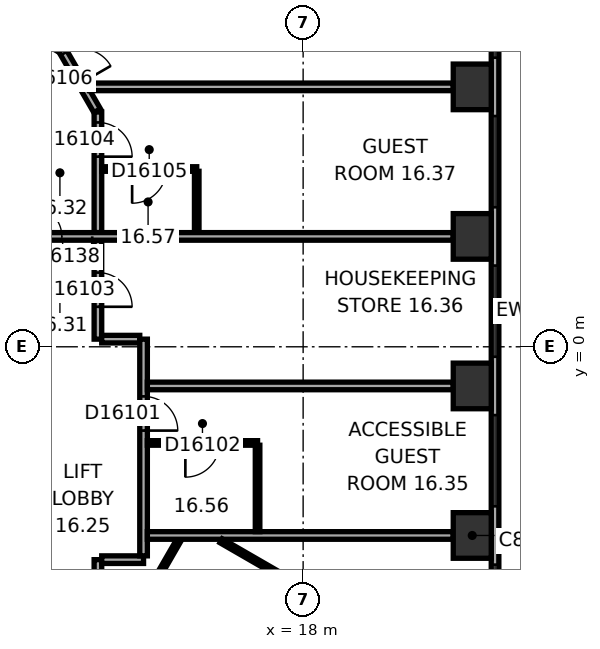
"""IFC4 building model, lengths in metres.
Left out: names, types, materials, properties, quantities, classifications, styles, units other than length and angle.
Written with IfcOpenShell. Run it as: python <this file> out.ifc"""

import sys

from ifc_helpers import new_model, si_unit, direction, frame, frame_2d, origin, origin_2d, place, context, subcontext, project, spatial, rectangle, extrude, element, fill, save


model = new_model("IFC4")
c1 = context("Model", 3, precision=1e-05, world=origin(), true_north=direction((0.0, 1.0)))
c2 = subcontext(c1, "Body", "Model", "MODEL_VIEW")
j1 = project(units=[si_unit("LENGTHUNIT", "METRE"), si_unit("PLANEANGLEUNIT", "RADIAN")], contexts=[c1])
p1 = place(None, origin())
s1 = spatial("IfcSite", under=j1, at=p1, CompositionType="ELEMENT")
p2 = place(p1, origin())
s2 = spatial("IfcBuilding", under=s1, at=p2, CompositionType="ELEMENT")
p3 = place(p2, frame((0.0, 0.0, 73.7)))
s3 = spatial("IfcBuildingStorey", under=s2, at=p3, CompositionType="ELEMENT", Elevation=73.7)
for number, where, z_axis, x_axis in (
    (1, (22.45, -4.965, 0.0), (0.0, 0.0, 1.0), (0.0, 1.0, 0.0)),
    (2, (22.45, -1.03, 0.0), (0.0, 0.0, 1.0), (0.0, 1.0, 0.0)),
    (3, (22.45, 2.905, 0.0), (0.0, 0.0, 1.0), (0.0, 1.0, 0.0)),
    (4, (22.45, 6.839, 0.0), (0.0, 0.0, 1.0), (0.0, 1.0, 0.0)),
):
    element("IfcColumn", number, at=place(p3, frame(where, z_axis=z_axis, x_axis=x_axis)), inside=s3, PredefinedType="COLUMN", context=c2, shape_type="SweptSolid", body=[
        extrude(rectangle(XDim=1.2, YDim=1.0, at=origin_2d()), origin(), (0.0, 0.0, 1.0), 3.3),
    ])
p4 = place(p3, frame((23.05, -9.687, 0.0), z_axis=(0.0, 0.0, 1.0), x_axis=(0.0, 1.0, 0.0)))
e5 = element("IfcWall", 5, at=p4, inside=s3, PredefinedType="STANDARD", context=c2, shape_type="SweptSolid", body=[
    extrude(rectangle(XDim=21.246, YDim=0.2, at=frame_2d((10.623, 0.0))), origin(), (0.0, 0.0, 1.0), 3.3),
])
p5 = place(p4, frame((1.555, 0.0, 0.8)))
e6 = element("IfcOpeningElement", 6, at=p5, cuts=e5, PredefinedType="OPENING", context=c2, shape_type="SweptSolid", body=[
    extrude(rectangle(XDim=2.4, YDim=1.7, at=frame_2d((1.2, 0.85))), frame((0.0, 0.11, 0.0), z_axis=(0.0, -1.0, 0.0), x_axis=(1.0, 0.0, 0.0)), (0.0, 0.0, 1.0), 0.22),
])
p6 = place(p4, frame((5.489, 0.0, 0.8)))
e7 = element("IfcOpeningElement", 7, at=p6, cuts=e5, PredefinedType="OPENING", context=c2, shape_type="SweptSolid", body=[
    extrude(rectangle(XDim=2.4, YDim=1.7, at=frame_2d((1.2, 0.85))), frame((0.0, 0.11, 0.0), z_axis=(0.0, -1.0, 0.0), x_axis=(1.0, 0.0, 0.0)), (0.0, 0.0, 1.0), 0.22),
])
p7 = place(p4, frame((9.424, 0.0, 0.8)))
e8 = element("IfcOpeningElement", 8, at=p7, cuts=e5, PredefinedType="OPENING", context=c2, shape_type="SweptSolid", body=[
    extrude(rectangle(XDim=2.4, YDim=1.7, at=frame_2d((1.2, 0.85))), frame((0.0, 0.11, 0.0), z_axis=(0.0, -1.0, 0.0), x_axis=(1.0, 0.0, 0.0)), (0.0, 0.0, 1.0), 0.22),
])
p8 = place(p4, frame((13.358, 0.0, 0.8)))
e9 = element("IfcOpeningElement", 9, at=p8, cuts=e5, PredefinedType="OPENING", context=c2, shape_type="SweptSolid", body=[
    extrude(rectangle(XDim=2.4, YDim=1.7, at=frame_2d((1.2, 0.85))), frame((0.0, 0.11, 0.0), z_axis=(0.0, -1.0, 0.0), x_axis=(1.0, 0.0, 0.0)), (0.0, 0.0, 1.0), 0.22),
])
p9 = place(p4, frame((17.293, 0.0, 0.8)))
e10 = element("IfcOpeningElement", 10, at=p9, cuts=e5, PredefinedType="OPENING", context=c2, shape_type="SweptSolid", body=[
    extrude(rectangle(XDim=2.4, YDim=1.7, at=frame_2d((1.2, 0.85))), frame((0.0, 0.11, 0.0), z_axis=(0.0, -1.0, 0.0), x_axis=(1.0, 0.0, 0.0)), (0.0, 0.0, 1.0), 0.22),
])
p10 = place(p3, frame((12.58, 6.212, 0.0), z_axis=(0.0, 0.0, 1.0), x_axis=(-0.500063286585, 0.865988862174, 0.0)))
e11 = element("IfcWall", 11, at=p10, inside=s3, PredefinedType="PARTITIONING", context=c2, shape_type="SweptSolid", body=[
    extrude(rectangle(XDim=1.86, YDim=0.2, at=frame_2d((0.93, 0.0))), origin(), (0.0, 0.0, 1.0), 2.95),
])
p11 = place(p10, frame((0.842, 0.0, 0.0)))
e12 = element("IfcOpeningElement", 12, at=p11, cuts=e11, PredefinedType="OPENING", context=c2, shape_type="SweptSolid", body=[
    extrude(rectangle(XDim=0.9, YDim=2.1, at=frame_2d((0.45, 1.05))), frame((0.0, 0.11, 0.0), z_axis=(0.0, -1.0, 0.0), x_axis=(1.0, 0.0, 0.0)), (0.0, 0.0, 1.0), 0.22),
])
p12 = place(p3, frame((12.6, -6.138, 0.0), z_axis=(0.0, 0.0, 1.0), x_axis=(0.0, 1.0, 0.0)))
e13 = element("IfcWall", 13, at=p12, inside=s3, PredefinedType="PARTITIONING", context=c2, shape_type="SweptSolid", body=[
    extrude(rectangle(XDim=0.537, YDim=0.2, at=frame_2d((0.268, 0.0))), origin(), (0.0, 0.0, 1.0), 2.95),
])
p13 = place(p3, frame((12.6, 0.201, 0.0), z_axis=(0.0, 0.0, 1.0), x_axis=(0.0, 1.0, 0.0)))
e14 = element("IfcWall", 14, at=p13, inside=s3, PredefinedType="PARTITIONING", context=c2, shape_type="SweptSolid", body=[
    extrude(rectangle(XDim=2.604, YDim=0.2, at=frame_2d((1.302, 0.0))), origin(), (0.0, 0.0, 1.0), 2.95),
])
p14 = place(p13, frame((0.852, 0.0, 0.0)))
e15 = element("IfcOpeningElement", 15, at=p14, cuts=e14, PredefinedType="OPENING", context=c2, shape_type="SweptSolid", body=[
    extrude(rectangle(XDim=0.9, YDim=2.1, at=frame_2d((0.45, 1.05))), frame((0.0, 0.11, 0.0), z_axis=(0.0, -1.0, 0.0), x_axis=(1.0, 0.0, 0.0)), (0.0, 0.0, 1.0), 0.22),
])
p15 = place(p3, frame((12.6, 3.004, 0.0), z_axis=(0.0, 0.0, 1.0), x_axis=(0.0, 1.0, 0.0)))
e16 = element("IfcWall", 16, at=p15, inside=s3, PredefinedType="PARTITIONING", context=c2, shape_type="SweptSolid", body=[
    extrude(rectangle(XDim=3.173, YDim=0.2, at=frame_2d((1.586, 0.0))), origin(), (0.0, 0.0, 1.0), 2.95),
])
p16 = place(p15, frame((1.998, 0.0, 0.0)))
e17 = element("IfcOpeningElement", 17, at=p16, cuts=e16, PredefinedType="OPENING", context=c2, shape_type="SweptSolid", body=[
    extrude(rectangle(XDim=0.9, YDim=2.1, at=frame_2d((0.45, 1.05))), frame((0.0, 0.11, 0.0), z_axis=(0.0, -1.0, 0.0), x_axis=(1.0, 0.0, 0.0)), (0.0, 0.0, 1.0), 0.22),
])
p17 = place(p3, frame((12.7, -5.601, 0.0), z_axis=(0.0, 0.0, 1.0), x_axis=(1.0, 0.0, 0.0)))
e18 = element("IfcWall", 18, at=p17, inside=s3, PredefinedType="PARTITIONING", context=c2, shape_type="SweptSolid", body=[
    extrude(rectangle(XDim=1.101, YDim=0.2, at=frame_2d((0.551, 0.0))), origin(), (0.0, 0.0, 1.0), 2.95),
])
p18 = place(p3, frame((12.7, 4.677, 0.0), z_axis=(0.0, 0.0, 1.0), x_axis=(1.0, 0.0, 0.0)))
e19 = element("IfcWall", 19, at=p18, inside=s3, PredefinedType="PARTITIONING", context=c2, shape_type="SweptSolid", body=[
    extrude(rectangle(XDim=2.5, YDim=0.12, at=frame_2d((1.25, 0.0))), origin(), (0.0, 0.0, 1.0), 2.95),
])
p19 = place(p18, frame((0.8, 0.0, 0.0)))
e20 = element("IfcOpeningElement", 20, at=p19, cuts=e19, PredefinedType="OPENING", context=c2, shape_type="SweptSolid", body=[
    extrude(rectangle(XDim=0.9, YDim=2.1, at=frame_2d((0.45, 1.05))), frame((0.0, 0.07, 0.0), z_axis=(0.0, -1.0, 0.0), x_axis=(1.0, 0.0, 0.0)), (0.0, 0.0, 1.0), 0.14),
])
p20 = place(p3, frame((13.701, 0.201, 0.0), z_axis=(0.0, 0.0, 1.0), x_axis=(-1.0, 0.0, 0.0)))
e21 = element("IfcWall", 21, at=p20, inside=s3, PredefinedType="PARTITIONING", context=c2, shape_type="SweptSolid", body=[
    extrude(rectangle(XDim=1.001, YDim=0.2, at=frame_2d((0.5, 0.0))), origin(), (0.0, 0.0, 1.0), 2.95),
])
p21 = place(p3, frame((13.801, -5.501, 0.0), z_axis=(0.0, 0.0, 1.0), x_axis=(0.0, 1.0, 0.0)))
e22 = element("IfcWall", 22, at=p21, inside=s3, PredefinedType="PARTITIONING", context=c2, shape_type="SweptSolid", body=[
    extrude(rectangle(XDim=5.702, YDim=0.2, at=frame_2d((2.851, 0.0))), origin(), (0.0, 0.0, 1.0), 2.95),
])
p22 = place(p21, frame((3.296, 0.0, 0.0)))
e23 = element("IfcOpeningElement", 23, at=p22, cuts=e22, PredefinedType="OPENING", context=c2, shape_type="SweptSolid", body=[
    extrude(rectangle(XDim=0.9, YDim=2.1, at=frame_2d((0.45, 1.05))), frame((0.0, 0.11, 0.0), z_axis=(0.0, -1.0, 0.0), x_axis=(1.0, 0.0, 0.0)), (0.0, 0.0, 1.0), 0.22),
])
p23 = place(p3, frame((13.901, -6.524, 0.0), z_axis=(0.0, 0.0, 1.0), x_axis=(0.499964162598, 0.86604609353, 0.0)))
e24 = element("IfcWall", 24, at=p23, inside=s3, PredefinedType="PARTITIONING", context=c2, shape_type="SweptSolid", body=[
    extrude(rectangle(XDim=1.661, YDim=0.12, at=frame_2d((0.831, 0.0))), origin(), (0.0, 0.0, 1.0), 2.95),
])
p24 = place(p3, frame((13.901, -4.965, 0.0), z_axis=(0.0, 0.0, 1.0), x_axis=(1.0, 0.0, 0.0)))
e25 = element("IfcWall", 25, at=p24, inside=s3, PredefinedType="PARTITIONING", context=c2, shape_type="SweptSolid", body=[
    extrude(rectangle(XDim=8.049, YDim=0.2, at=frame_2d((4.024, 0.0))), origin(), (0.0, 0.0, 1.0), 2.95),
])
p25 = place(p3, frame((13.901, -2.53, 0.0), z_axis=(0.0, 0.0, 1.0), x_axis=(1.0, 0.0, 0.0)))
e26 = element("IfcWall", 26, at=p25, inside=s3, PredefinedType="PARTITIONING", context=c2, shape_type="SweptSolid", body=[
    extrude(rectangle(XDim=2.9, YDim=0.12, at=frame_2d((1.45, 0.0))), origin(), (0.0, 0.0, 1.0), 2.95),
])
p26 = place(p25, frame((1.0, 0.0, 0.0)))
e27 = element("IfcOpeningElement", 27, at=p26, cuts=e26, PredefinedType="OPENING", context=c2, shape_type="SweptSolid", body=[
    extrude(rectangle(XDim=0.9, YDim=2.1, at=frame_2d((0.45, 1.05))), frame((0.0, 0.07, 0.0), z_axis=(0.0, -1.0, 0.0), x_axis=(1.0, 0.0, 0.0)), (0.0, 0.0, 1.0), 0.14),
])
p27 = place(p3, frame((15.2, 4.618, 0.0), z_axis=(0.0, 0.0, 1.0), x_axis=(0.0, -1.0, 0.0)))
e28 = element("IfcWall", 28, at=p27, inside=s3, PredefinedType="PARTITIONING", context=c2, shape_type="SweptSolid", body=[
    extrude(rectangle(XDim=1.613, YDim=0.12, at=frame_2d((0.807, 0.0))), origin(), (0.0, 0.0, 1.0), 2.95),
])
p28 = place(p3, frame((15.841, -5.104, 0.0), z_axis=(0.0, 0.0, 1.0), x_axis=(0.866025591402, -0.499999675036, 0.0)))
e29 = element("IfcWall", 29, at=p28, inside=s3, PredefinedType="PARTITIONING", context=c2, shape_type="SweptSolid", body=[
    extrude(rectangle(XDim=1.83, YDim=0.12, at=frame_2d((0.915, 0.0))), origin(), (0.0, 0.0, 1.0), 2.95),
])
p29 = place(p3, frame((16.801, -2.59, 0.0), z_axis=(0.0, 0.0, 1.0), x_axis=(0.0, -1.0, 0.0)))
e30 = element("IfcWall", 30, at=p29, inside=s3, PredefinedType="PARTITIONING", context=c2, shape_type="SweptSolid", body=[
    extrude(rectangle(XDim=2.274, YDim=0.12, at=frame_2d((1.137, 0.0))), origin(), (0.0, 0.0, 1.0), 2.95),
])
p30 = place(p3, frame((21.95, -1.03, 0.0), z_axis=(0.0, 0.0, 1.0), x_axis=(-1.0, 0.0, 0.0)))
e31 = element("IfcWall", 31, at=p30, inside=s3, PredefinedType="PARTITIONING", context=c2, shape_type="SweptSolid", body=[
    extrude(rectangle(XDim=8.049, YDim=0.2, at=frame_2d((4.024, 0.0))), origin(), (0.0, 0.0, 1.0), 2.15),
])
p31 = place(p3, frame((21.95, 2.905, 0.0), z_axis=(0.0, 0.0, 1.0), x_axis=(-1.0, 0.0, 0.0)))
e32 = element("IfcWall", 32, at=p31, inside=s3, PredefinedType="PARTITIONING", context=c2, shape_type="SweptSolid", body=[
    extrude(rectangle(XDim=11.25, YDim=0.2, at=frame_2d((5.625, 0.0))), origin(), (0.0, 0.0, 1.0), 2.95),
])
p32 = place(p31, frame((9.5, 0.0, 0.0)))
e33 = element("IfcOpeningElement", 33, at=p32, cuts=e32, PredefinedType="OPENING", context=c2, shape_type="SweptSolid", body=[
    extrude(rectangle(XDim=1.6, YDim=2.1, at=frame_2d((0.8, 1.05))), frame((0.0, 0.11, 0.0), z_axis=(0.0, -1.0, 0.0), x_axis=(1.0, 0.0, 0.0)), (0.0, 0.0, 1.0), 0.22),
])
p33 = place(p3, frame((21.95, 6.839, 0.0), z_axis=(0.0, 0.0, 1.0), x_axis=(-1.0, 0.0, 0.0)))
e34 = element("IfcWall", 34, at=p33, inside=s3, PredefinedType="PARTITIONING", context=c2, shape_type="SweptSolid", body=[
    extrude(rectangle(XDim=9.572, YDim=0.2, at=frame_2d((4.786, 0.0))), origin(), (0.0, 0.0, 1.0), 2.95),
])
p34 = place(p5, origin())
e35 = element("IfcWindow", 35, at=p34, inside=s3, PartitioningType="SINGLE_PANEL", PredefinedType="WINDOW", context=c2, shape_type="SweptSolid", body=[
    extrude(rectangle(XDim=2.4, YDim=1.7, at=frame_2d((1.2, 0.85))), frame((0.0, 0.03, 0.0), z_axis=(0.0, -1.0, 0.0), x_axis=(1.0, 0.0, 0.0)), (0.0, 0.0, 1.0), 0.06),
])
fill(e6, e35)
p35 = place(p6, origin())
e36 = element("IfcWindow", 36, at=p35, inside=s3, PartitioningType="SINGLE_PANEL", PredefinedType="WINDOW", context=c2, shape_type="SweptSolid", body=[
    extrude(rectangle(XDim=2.4, YDim=1.7, at=frame_2d((1.2, 0.85))), frame((0.0, 0.03, 0.0), z_axis=(0.0, -1.0, 0.0), x_axis=(1.0, 0.0, 0.0)), (0.0, 0.0, 1.0), 0.06),
])
fill(e7, e36)
p36 = place(p7, origin())
e37 = element("IfcWindow", 37, at=p36, inside=s3, PartitioningType="SINGLE_PANEL", PredefinedType="WINDOW", context=c2, shape_type="SweptSolid", body=[
    extrude(rectangle(XDim=2.4, YDim=1.7, at=frame_2d((1.2, 0.85))), frame((0.0, 0.03, 0.0), z_axis=(0.0, -1.0, 0.0), x_axis=(1.0, 0.0, 0.0)), (0.0, 0.0, 1.0), 0.06),
])
fill(e8, e37)
p37 = place(p8, origin())
e38 = element("IfcWindow", 38, at=p37, inside=s3, PartitioningType="SINGLE_PANEL", PredefinedType="WINDOW", context=c2, shape_type="SweptSolid", body=[
    extrude(rectangle(XDim=2.4, YDim=1.7, at=frame_2d((1.2, 0.85))), frame((0.0, 0.03, 0.0), z_axis=(0.0, -1.0, 0.0), x_axis=(1.0, 0.0, 0.0)), (0.0, 0.0, 1.0), 0.06),
])
fill(e9, e38)
p38 = place(p9, origin())
e39 = element("IfcWindow", 39, at=p38, inside=s3, PartitioningType="SINGLE_PANEL", PredefinedType="WINDOW", context=c2, shape_type="SweptSolid", body=[
    extrude(rectangle(XDim=2.4, YDim=1.7, at=frame_2d((1.2, 0.85))), frame((0.0, 0.03, 0.0), z_axis=(0.0, -1.0, 0.0), x_axis=(1.0, 0.0, 0.0)), (0.0, 0.0, 1.0), 0.06),
])
fill(e10, e39)
p39 = place(p22, origin())
e40 = element("IfcDoor", 40, at=p39, inside=s3, OperationType="SINGLE_SWING_LEFT", PredefinedType="DOOR", context=c2, shape_type="SweptSolid", body=[
    extrude(rectangle(XDim=0.9, YDim=2.1, at=frame_2d((0.45, 1.05))), frame((0.0, 0.025, 0.0), z_axis=(0.0, -1.0, 0.0), x_axis=(1.0, 0.0, 0.0)), (0.0, 0.0, 1.0), 0.05),
])
fill(e23, e40)
p40 = place(p26, origin())
e41 = element("IfcDoor", 41, at=p40, inside=s3, OperationType="SINGLE_SWING_LEFT", PredefinedType="DOOR", context=c2, shape_type="SweptSolid", body=[
    extrude(rectangle(XDim=0.9, YDim=2.1, at=frame_2d((0.45, 1.05))), frame((0.0, 0.025, 0.0), z_axis=(0.0, -1.0, 0.0), x_axis=(1.0, 0.0, 0.0)), (0.0, 0.0, 1.0), 0.05),
])
fill(e27, e41)
p41 = place(p14, origin())
e42 = element("IfcDoor", 42, at=p41, inside=s3, OperationType="SINGLE_SWING_LEFT", PredefinedType="DOOR", context=c2, shape_type="SweptSolid", body=[
    extrude(rectangle(XDim=0.9, YDim=2.1, at=frame_2d((0.45, 1.05))), frame((0.0, 0.025, 0.0), z_axis=(0.0, -1.0, 0.0), x_axis=(1.0, 0.0, 0.0)), (0.0, 0.0, 1.0), 0.05),
])
fill(e15, e42)
p42 = place(p16, origin())
e43 = element("IfcDoor", 43, at=p42, inside=s3, OperationType="SINGLE_SWING_LEFT", PredefinedType="DOOR", context=c2, shape_type="SweptSolid", body=[
    extrude(rectangle(XDim=0.9, YDim=2.1, at=frame_2d((0.45, 1.05))), frame((0.0, 0.025, 0.0), z_axis=(0.0, -1.0, 0.0), x_axis=(1.0, 0.0, 0.0)), (0.0, 0.0, 1.0), 0.05),
])
fill(e17, e43)
p43 = place(p19, origin())
e44 = element("IfcDoor", 44, at=p43, inside=s3, OperationType="SINGLE_SWING_LEFT", PredefinedType="DOOR", context=c2, shape_type="SweptSolid", body=[
    extrude(rectangle(XDim=0.9, YDim=2.1, at=frame_2d((0.45, 1.05))), frame((0.0, 0.025, 0.0), z_axis=(0.0, -1.0, 0.0), x_axis=(1.0, 0.0, 0.0)), (0.0, 0.0, 1.0), 0.05),
])
fill(e20, e44)
p44 = place(p11, origin())
e45 = element("IfcDoor", 45, at=p44, inside=s3, OperationType="SINGLE_SWING_LEFT", PredefinedType="DOOR", context=c2, shape_type="SweptSolid", body=[
    extrude(rectangle(XDim=0.9, YDim=2.1, at=frame_2d((0.45, 1.05))), frame((0.0, 0.025, 0.0), z_axis=(0.0, -1.0, 0.0), x_axis=(1.0, 0.0, 0.0)), (0.0, 0.0, 1.0), 0.05),
])
fill(e12, e45)
p45 = place(p32, origin())
e46 = element("IfcDoor", 46, at=p45, inside=s3, OperationType="DOUBLE_DOOR_SINGLE_SWING", PredefinedType="DOOR", context=c2, shape_type="SweptSolid", body=[
    extrude(rectangle(XDim=1.6, YDim=2.1, at=frame_2d((0.8, 1.05))), frame((0.0, 0.025, 0.0), z_axis=(0.0, -1.0, 0.0), x_axis=(1.0, 0.0, 0.0)), (0.0, 0.0, 1.0), 0.05),
])
fill(e33, e46)
save(model, sys.argv[1])
